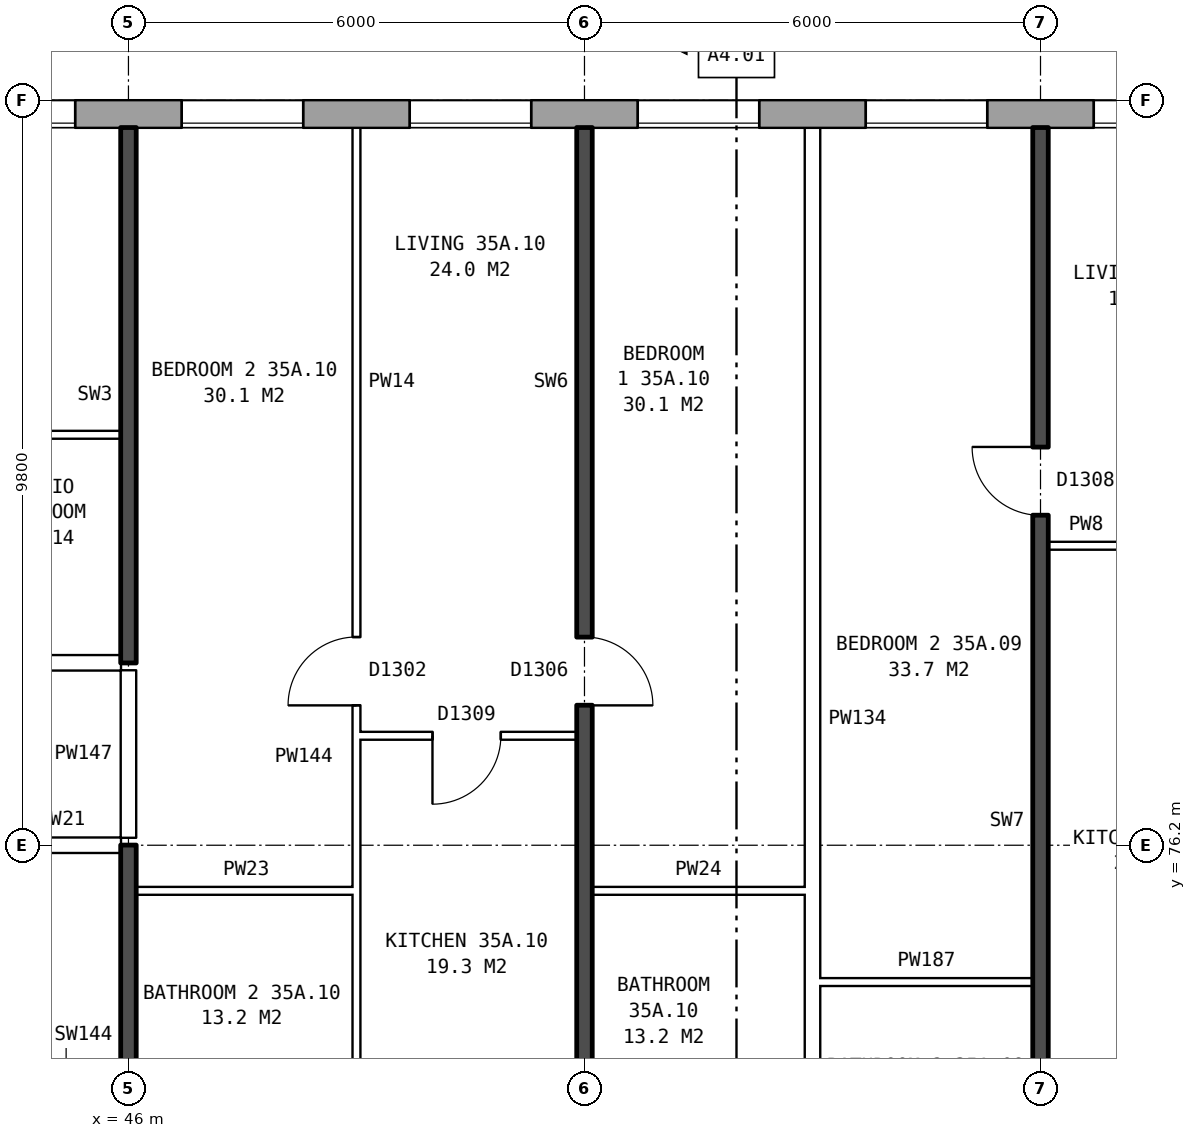
"""IFC4 building model, lengths in metres.
Left out: names, types, materials, properties, quantities, classifications, styles, units other than length and angle.
Written with IfcOpenShell. Run it as: python <this file> out.ifc"""

import sys

from ifc_helpers import new_model, si_unit, direction, frame, frame_2d, origin, place, context, subcontext, project, spatial, rectangle, extrude, element, fill, save


model = new_model("IFC4")
c1 = context("Model", 3, precision=1e-05, world=origin(), true_north=direction((0.0, 1.0)))
c2 = subcontext(c1, "Body", "Model", "MODEL_VIEW")
j1 = project(units=[si_unit("LENGTHUNIT", "METRE"), si_unit("PLANEANGLEUNIT", "RADIAN")], contexts=[c1])
p1 = place(None, origin())
s1 = spatial("IfcSite", under=j1, at=p1, CompositionType="ELEMENT")
p2 = place(p1, origin())
s2 = spatial("IfcBuilding", under=s1, at=p2, CompositionType="ELEMENT")
p3 = place(p2, frame((0.0, 0.0, 126.8)))
s3 = spatial("IfcBuildingStorey", under=s2, at=p3, CompositionType="ELEMENT", Elevation=126.8)
p4 = place(p3, frame((72.925, 85.82, 0.0), z_axis=(0.0, 0.0, 1.0), x_axis=(-1.0, 0.0, 0.0)))
e1 = element("IfcWall", 1, at=p4, inside=s3, PredefinedType="STANDARD", context=c2, shape_type="SweptSolid", body=[
    extrude(rectangle(XDim=43.101, YDim=0.36, at=frame_2d((21.55, 0.0))), origin(), (0.0, 0.0, 1.0), 2.85),
])
p5 = place(p4, frame((0.625, 0.0, 0.8)))
e2 = element("IfcOpeningElement", 2, at=p5, cuts=e1, PredefinedType="OPENING", context=c2, shape_type="SweptSolid", body=[
    extrude(rectangle(XDim=1.6, YDim=1.8, at=frame_2d((0.8, 0.9))), frame((0.0, 0.19, 0.0), z_axis=(0.0, -1.0, 0.0), x_axis=(1.0, 0.0, 0.0)), (0.0, 0.0, 1.0), 0.38),
])
p6 = place(p4, frame((3.625, 0.0, 0.8)))
e3 = element("IfcOpeningElement", 3, at=p6, cuts=e1, PredefinedType="OPENING", context=c2, shape_type="SweptSolid", body=[
    extrude(rectangle(XDim=1.6, YDim=1.8, at=frame_2d((0.8, 0.9))), frame((0.0, 0.19, 0.0), z_axis=(0.0, -1.0, 0.0), x_axis=(1.0, 0.0, 0.0)), (0.0, 0.0, 1.0), 0.38),
])
p7 = place(p4, frame((5.525, 0.0, 1.7)))
e4 = element("IfcOpeningElement", 4, at=p7, cuts=e1, PredefinedType="OPENING", context=c2, shape_type="SweptSolid", body=[
    extrude(rectangle(XDim=0.8, YDim=0.9, at=frame_2d((0.4, 0.45))), frame((0.0, 0.19, 0.0), z_axis=(0.0, -1.0, 0.0), x_axis=(1.0, 0.0, 0.0)), (0.0, 0.0, 1.0), 0.38),
])
p8 = place(p4, frame((9.625, 0.0, 0.8)))
e5 = element("IfcOpeningElement", 5, at=p8, cuts=e1, PredefinedType="OPENING", context=c2, shape_type="SweptSolid", body=[
    extrude(rectangle(XDim=1.6, YDim=1.8, at=frame_2d((0.8, 0.9))), frame((0.0, 0.19, 0.0), z_axis=(0.0, -1.0, 0.0), x_axis=(1.0, 0.0, 0.0)), (0.0, 0.0, 1.0), 0.38),
])
p9 = place(p4, frame((12.625, 0.0, 0.8)))
e6 = element("IfcOpeningElement", 6, at=p9, cuts=e1, PredefinedType="OPENING", context=c2, shape_type="SweptSolid", body=[
    extrude(rectangle(XDim=1.6, YDim=1.8, at=frame_2d((0.8, 0.9))), frame((0.0, 0.19, 0.0), z_axis=(0.0, -1.0, 0.0), x_axis=(1.0, 0.0, 0.0)), (0.0, 0.0, 1.0), 0.38),
])
p10 = place(p4, frame((15.625, 0.0, 0.8)))
e7 = element("IfcOpeningElement", 7, at=p10, cuts=e1, PredefinedType="OPENING", context=c2, shape_type="SweptSolid", body=[
    extrude(rectangle(XDim=1.6, YDim=1.8, at=frame_2d((0.8, 0.9))), frame((0.0, 0.19, 0.0), z_axis=(0.0, -1.0, 0.0), x_axis=(1.0, 0.0, 0.0)), (0.0, 0.0, 1.0), 0.38),
])
p11 = place(p4, frame((18.625, 0.0, 0.8)))
e8 = element("IfcOpeningElement", 8, at=p11, cuts=e1, PredefinedType="OPENING", context=c2, shape_type="SweptSolid", body=[
    extrude(rectangle(XDim=1.6, YDim=1.8, at=frame_2d((0.8, 0.9))), frame((0.0, 0.19, 0.0), z_axis=(0.0, -1.0, 0.0), x_axis=(1.0, 0.0, 0.0)), (0.0, 0.0, 1.0), 0.38),
])
p12 = place(p4, frame((21.625, 0.0, 0.8)))
e9 = element("IfcOpeningElement", 9, at=p12, cuts=e1, PredefinedType="OPENING", context=c2, shape_type="SweptSolid", body=[
    extrude(rectangle(XDim=1.6, YDim=1.8, at=frame_2d((0.8, 0.9))), frame((0.0, 0.19, 0.0), z_axis=(0.0, -1.0, 0.0), x_axis=(1.0, 0.0, 0.0)), (0.0, 0.0, 1.0), 0.38),
])
p13 = place(p4, frame((24.625, 0.0, 0.8)))
e10 = element("IfcOpeningElement", 10, at=p13, cuts=e1, PredefinedType="OPENING", context=c2, shape_type="SweptSolid", body=[
    extrude(rectangle(XDim=1.6, YDim=1.8, at=frame_2d((0.8, 0.9))), frame((0.0, 0.19, 0.0), z_axis=(0.0, -1.0, 0.0), x_axis=(1.0, 0.0, 0.0)), (0.0, 0.0, 1.0), 0.38),
])
p14 = place(p4, frame((27.625, 0.0, 0.8)))
e11 = element("IfcOpeningElement", 11, at=p14, cuts=e1, PredefinedType="OPENING", context=c2, shape_type="SweptSolid", body=[
    extrude(rectangle(XDim=1.6, YDim=1.8, at=frame_2d((0.8, 0.9))), frame((0.0, 0.19, 0.0), z_axis=(0.0, -1.0, 0.0), x_axis=(1.0, 0.0, 0.0)), (0.0, 0.0, 1.0), 0.38),
])
p15 = place(p4, frame((30.625, 0.0, 0.8)))
e12 = element("IfcOpeningElement", 12, at=p15, cuts=e1, PredefinedType="OPENING", context=c2, shape_type="SweptSolid", body=[
    extrude(rectangle(XDim=1.6, YDim=1.8, at=frame_2d((0.8, 0.9))), frame((0.0, 0.19, 0.0), z_axis=(0.0, -1.0, 0.0), x_axis=(1.0, 0.0, 0.0)), (0.0, 0.0, 1.0), 0.38),
])
p16 = place(p4, frame((33.125, 0.0, 0.8)))
e13 = element("IfcOpeningElement", 13, at=p16, cuts=e1, PredefinedType="OPENING", context=c2, shape_type="SweptSolid", body=[
    extrude(rectangle(XDim=1.4, YDim=1.8, at=frame_2d((0.7, 0.9))), frame((0.0, 0.19, 0.0), z_axis=(0.0, -1.0, 0.0), x_axis=(1.0, 0.0, 0.0)), (0.0, 0.0, 1.0), 0.38),
])
p17 = place(p4, frame((34.825, 0.0, 0.8)))
e14 = element("IfcOpeningElement", 14, at=p17, cuts=e1, PredefinedType="OPENING", context=c2, shape_type="SweptSolid", body=[
    extrude(rectangle(XDim=0.6, YDim=0.9, at=frame_2d((0.3, 0.45))), frame((0.0, 0.19, 0.0), z_axis=(0.0, -1.0, 0.0), x_axis=(1.0, 0.0, 0.0)), (0.0, 0.0, 1.0), 0.38),
])
p18 = place(p4, frame((39.625, 0.0, 0.8)))
e15 = element("IfcOpeningElement", 15, at=p18, cuts=e1, PredefinedType="OPENING", context=c2, shape_type="SweptSolid", body=[
    extrude(rectangle(XDim=1.6, YDim=1.8, at=frame_2d((0.8, 0.9))), frame((0.0, 0.19, 0.0), z_axis=(0.0, -1.0, 0.0), x_axis=(1.0, 0.0, 0.0)), (0.0, 0.0, 1.0), 0.38),
])
p19 = place(p4, frame((7.525, 0.0, 0.8)))
e16 = element("IfcOpeningElement", 16, at=p19, cuts=e1, PredefinedType="OPENING", context=c2, shape_type="SweptSolid", body=[
    extrude(rectangle(XDim=1.2, YDim=0.9, at=frame_2d((0.6, 0.45))), frame((0.0, 0.19, 0.0), z_axis=(0.0, -1.0, 0.0), x_axis=(1.0, 0.0, 0.0)), (0.0, 0.0, 1.0), 0.38),
])
p20 = place(p4, frame((36.725, 0.0, 1.7)))
e17 = element("IfcOpeningElement", 17, at=p20, cuts=e1, PredefinedType="OPENING", context=c2, shape_type="SweptSolid", body=[
    extrude(rectangle(XDim=0.6, YDim=0.9, at=frame_2d((0.3, 0.45))), frame((0.0, 0.19, 0.0), z_axis=(0.0, -1.0, 0.0), x_axis=(1.0, 0.0, 0.0)), (0.0, 0.0, 1.0), 0.38),
])
p21 = place(p4, frame((37.725, 0.0, 0.8)))
e18 = element("IfcOpeningElement", 18, at=p21, cuts=e1, PredefinedType="OPENING", context=c2, shape_type="SweptSolid", body=[
    extrude(rectangle(XDim=1.0, YDim=1.8, at=frame_2d((0.5, 0.9))), frame((0.0, 0.19, 0.0), z_axis=(0.0, -1.0, 0.0), x_axis=(1.0, 0.0, 0.0)), (0.0, 0.0, 1.0), 0.38),
])
p22 = place(p3, frame((55.1, 74.4, 0.0), z_axis=(0.0, 0.0, 1.0), x_axis=(1.0, 0.0, 0.0)))
e19 = element("IfcWall", 19, at=p22, inside=s3, PredefinedType="PARTITIONING", context=c2, shape_type="SweptSolid", body=[
    extrude(rectangle(XDim=2.8, YDim=0.1, at=frame_2d((1.4, 0.0))), origin(), (0.0, 0.0, 1.0), 2.85),
])
p23 = place(p3, frame((46.1, 75.6, 0.0), z_axis=(0.0, 0.0, 1.0), x_axis=(1.0, 0.0, 0.0)))
e20 = element("IfcWall", 20, at=p23, inside=s3, PredefinedType="PARTITIONING", context=c2, shape_type="SweptSolid", body=[
    extrude(rectangle(XDim=2.9, YDim=0.1, at=frame_2d((1.45, 0.0))), origin(), (0.0, 0.0, 1.0), 2.85),
])
p24 = place(p3, frame((52.1, 75.6, 0.0), z_axis=(0.0, 0.0, 1.0), x_axis=(1.0, 0.0, 0.0)))
e21 = element("IfcWall", 21, at=p24, inside=s3, PredefinedType="PARTITIONING", context=c2, shape_type="SweptSolid", body=[
    extrude(rectangle(XDim=2.8, YDim=0.1, at=frame_2d((1.4, 0.0))), origin(), (0.0, 0.0, 1.0), 2.85),
])
p25 = place(p3, frame((44.36, 76.2, 0.0), z_axis=(0.0, 0.0, 1.0), x_axis=(1.0, 0.0, 0.0)))
e22 = element("IfcWall", 22, at=p25, inside=s3, PredefinedType="PARTITIONING", context=c2, shape_type="SweptSolid", body=[
    extrude(rectangle(XDim=1.54, YDim=0.2, at=frame_2d((0.77, 0.0))), origin(), (0.0, 0.0, 1.0), 2.85),
])
p26 = place(p3, frame((49.0, 77.64, 0.0), z_axis=(0.0, 0.0, 1.0), x_axis=(1.0, 0.0, 0.0)))
e23 = element("IfcWall", 23, at=p26, inside=s3, PredefinedType="PARTITIONING", context=c2, shape_type="SweptSolid", body=[
    extrude(rectangle(XDim=2.9, YDim=0.1, at=frame_2d((1.45, 0.0))), origin(), (0.0, 0.0, 1.0), 2.85),
])
p27 = place(p26, frame((1.0, 0.0, 0.0)))
e24 = element("IfcOpeningElement", 24, at=p27, cuts=e23, PredefinedType="OPENING", context=c2, shape_type="SweptSolid", body=[
    extrude(rectangle(XDim=0.9, YDim=2.1, at=frame_2d((0.45, 1.05))), frame((0.0, 0.06, 0.0), z_axis=(0.0, -1.0, 0.0), x_axis=(1.0, 0.0, 0.0)), (0.0, 0.0, 1.0), 0.12),
])
p28 = place(p3, frame((27.11, 78.6, 0.0), z_axis=(0.0, 0.0, 1.0), x_axis=(1.0, 0.0, 0.0)))
e25 = element("IfcWall", 25, at=p28, inside=s3, PredefinedType="PARTITIONING", context=c2, shape_type="SweptSolid", body=[
    extrude(rectangle(XDim=18.79, YDim=0.2, at=frame_2d((9.395, 0.0))), origin(), (0.0, 0.0, 1.0), 2.85),
])
p29 = place(p28, frame((14.19, 0.0, 0.0)))
e26 = element("IfcOpeningElement", 26, at=p29, cuts=e25, PredefinedType="OPENING", context=c2, shape_type="SweptSolid", body=[
    extrude(rectangle(XDim=1.0, YDim=2.1, at=frame_2d((0.5, 1.05))), frame((0.0, 0.11, 0.0), z_axis=(0.0, -1.0, 0.0), x_axis=(1.0, 0.0, 0.0)), (0.0, 0.0, 1.0), 0.22),
])
p30 = place(p28, frame((10.39, 0.0, 0.0)))
e27 = element("IfcOpeningElement", 27, at=p30, cuts=e25, PredefinedType="OPENING", context=c2, shape_type="SweptSolid", body=[
    extrude(rectangle(XDim=1.0, YDim=2.1, at=frame_2d((0.5, 1.05))), frame((0.0, 0.11, 0.0), z_axis=(0.0, -1.0, 0.0), x_axis=(1.0, 0.0, 0.0)), (0.0, 0.0, 1.0), 0.22),
])
p31 = place(p28, frame((4.59, 0.0, 0.0)))
e28 = element("IfcOpeningElement", 28, at=p31, cuts=e25, PredefinedType="OPENING", context=c2, shape_type="SweptSolid", body=[
    extrude(rectangle(XDim=1.0, YDim=2.1, at=frame_2d((0.5, 1.05))), frame((0.0, 0.11, 0.0), z_axis=(0.0, -1.0, 0.0), x_axis=(1.0, 0.0, 0.0)), (0.0, 0.0, 1.0), 0.22),
])
p32 = place(p3, frame((58.1, 80.14, 0.0), z_axis=(0.0, 0.0, 1.0), x_axis=(1.0, 0.0, 0.0)))
e29 = element("IfcWall", 29, at=p32, inside=s3, PredefinedType="PARTITIONING", context=c2, shape_type="SweptSolid", body=[
    extrude(rectangle(XDim=2.9, YDim=0.1, at=frame_2d((1.45, 0.0))), origin(), (0.0, 0.0, 1.0), 2.85),
])
p33 = place(p32, frame((1.0, 0.0, 0.0)))
e30 = element("IfcOpeningElement", 30, at=p33, cuts=e29, PredefinedType="OPENING", context=c2, shape_type="SweptSolid", body=[
    extrude(rectangle(XDim=0.9, YDim=2.1, at=frame_2d((0.45, 1.05))), frame((0.0, 0.06, 0.0), z_axis=(0.0, -1.0, 0.0), x_axis=(1.0, 0.0, 0.0)), (0.0, 0.0, 1.0), 0.12),
])
p34 = place(p3, frame((43.6, 81.6, 0.0), z_axis=(0.0, 0.0, 1.0), x_axis=(1.0, 0.0, 0.0)))
e31 = element("IfcWall", 31, at=p34, inside=s3, PredefinedType="PARTITIONING", context=c2, shape_type="SweptSolid", body=[
    extrude(rectangle(XDim=2.3, YDim=0.1, at=frame_2d((1.15, 0.0))), origin(), (0.0, 0.0, 1.0), 2.85),
])
p35 = place(p3, frame((46.0, 71.2, 0.0), z_axis=(0.0, 0.0, 1.0), x_axis=(0.0, 1.0, 0.0)))
e32 = element("IfcWall", 32, at=p35, inside=s3, PredefinedType="SOLIDWALL", context=c2, shape_type="SweptSolid", body=[
    extrude(rectangle(XDim=5.0, YDim=0.2, at=frame_2d((2.5, 0.0))), origin(), (0.0, 0.0, 1.0), 2.85),
])
p36 = place(p3, frame((46.0, 76.3, 0.0), z_axis=(0.0, 0.0, 1.0), x_axis=(0.0, 1.0, 0.0)))
e33 = element("IfcWall", 33, at=p36, inside=s3, PredefinedType="PARTITIONING", context=c2, shape_type="SweptSolid", body=[
    extrude(rectangle(XDim=2.2, YDim=0.2, at=frame_2d((1.1, 0.0))), origin(), (0.0, 0.0, 1.0), 2.85),
])
p37 = place(p3, frame((46.0, 78.6, 0.0), z_axis=(0.0, 0.0, 1.0), x_axis=(0.0, 1.0, 0.0)))
e34 = element("IfcWall", 34, at=p37, inside=s3, PredefinedType="SOLIDWALL", context=c2, shape_type="SweptSolid", body=[
    extrude(rectangle(XDim=7.04, YDim=0.2, at=frame_2d((3.52, 0.0))), origin(), (0.0, 0.0, 1.0), 2.85),
])
p38 = place(p3, frame((49.0, 71.3, 0.0), z_axis=(0.0, 0.0, 1.0), x_axis=(0.0, 1.0, 0.0)))
e35 = element("IfcWall", 35, at=p38, inside=s3, PredefinedType="PARTITIONING", context=c2, shape_type="SweptSolid", body=[
    extrude(rectangle(XDim=14.34, YDim=0.1, at=frame_2d((7.17, 0.0))), origin(), (0.0, 0.0, 1.0), 2.85),
])
p39 = place(p38, frame((6.74, 0.0, 0.0)))
e36 = element("IfcOpeningElement", 36, at=p39, cuts=e35, PredefinedType="OPENING", context=c2, shape_type="SweptSolid", body=[
    extrude(rectangle(XDim=0.9, YDim=2.1, at=frame_2d((0.45, 1.05))), frame((0.0, 0.06, 0.0), z_axis=(0.0, -1.0, 0.0), x_axis=(1.0, 0.0, 0.0)), (0.0, 0.0, 1.0), 0.12),
])
p40 = place(p38, frame((0.4, 0.0, 0.0)))
e37 = element("IfcOpeningElement", 37, at=p40, cuts=e35, PredefinedType="OPENING", context=c2, shape_type="SweptSolid", body=[
    extrude(rectangle(XDim=0.9, YDim=2.1, at=frame_2d((0.45, 1.05))), frame((0.0, 0.06, 0.0), z_axis=(0.0, -1.0, 0.0), x_axis=(1.0, 0.0, 0.0)), (0.0, 0.0, 1.0), 0.12),
])
p41 = place(p3, frame((52.0, 71.2, 0.0), z_axis=(0.0, 0.0, 1.0), x_axis=(0.0, 1.0, 0.0)))
e38 = element("IfcWall", 38, at=p41, inside=s3, PredefinedType="SOLIDWALL", context=c2, shape_type="SweptSolid", body=[
    extrude(rectangle(XDim=14.44, YDim=0.2, at=frame_2d((7.22, 0.0))), origin(), (0.0, 0.0, 1.0), 2.85),
])
p42 = place(p41, frame((6.84, 0.0, 0.0)))
e39 = element("IfcOpeningElement", 39, at=p42, cuts=e38, PredefinedType="OPENING", context=c2, shape_type="SweptSolid", body=[
    extrude(rectangle(XDim=0.9, YDim=2.1, at=frame_2d((0.45, 1.05))), frame((0.0, 0.11, 0.0), z_axis=(0.0, -1.0, 0.0), x_axis=(1.0, 0.0, 0.0)), (0.0, 0.0, 1.0), 0.22),
])
p43 = place(p41, frame((0.4, 0.0, 0.0)))
e40 = element("IfcOpeningElement", 40, at=p43, cuts=e38, PredefinedType="OPENING", context=c2, shape_type="SweptSolid", body=[
    extrude(rectangle(XDim=0.9, YDim=2.1, at=frame_2d((0.45, 1.05))), frame((0.0, 0.11, 0.0), z_axis=(0.0, -1.0, 0.0), x_axis=(1.0, 0.0, 0.0)), (0.0, 0.0, 1.0), 0.22),
])
p44 = place(p3, frame((55.0, 71.3, 0.0), z_axis=(0.0, 0.0, 1.0), x_axis=(0.0, 1.0, 0.0)))
e41 = element("IfcWall", 41, at=p44, inside=s3, PredefinedType="PARTITIONING", context=c2, shape_type="SweptSolid", body=[
    extrude(rectangle(XDim=14.34, YDim=0.2, at=frame_2d((7.17, 0.0))), origin(), (0.0, 0.0, 1.0), 2.85),
])
p45 = place(p3, frame((58.0, 71.2, 0.0), z_axis=(0.0, 0.0, 1.0), x_axis=(0.0, 1.0, 0.0)))
e42 = element("IfcWall", 42, at=p45, inside=s3, PredefinedType="SOLIDWALL", context=c2, shape_type="SweptSolid", body=[
    extrude(rectangle(XDim=14.44, YDim=0.2, at=frame_2d((7.22, 0.0))), origin(), (0.0, 0.0, 1.0), 2.85),
])
p46 = place(p45, frame((9.34, 0.0, 0.0)))
e43 = element("IfcOpeningElement", 43, at=p46, cuts=e42, PredefinedType="OPENING", context=c2, shape_type="SweptSolid", body=[
    extrude(rectangle(XDim=0.9, YDim=2.1, at=frame_2d((0.45, 1.05))), frame((0.0, 0.11, 0.0), z_axis=(0.0, -1.0, 0.0), x_axis=(1.0, 0.0, 0.0)), (0.0, 0.0, 1.0), 0.22),
])
p47 = place(p45, frame((0.4, 0.0, 0.0)))
e44 = element("IfcOpeningElement", 44, at=p47, cuts=e42, PredefinedType="OPENING", context=c2, shape_type="SweptSolid", body=[
    extrude(rectangle(XDim=0.9, YDim=2.1, at=frame_2d((0.45, 1.05))), frame((0.0, 0.11, 0.0), z_axis=(0.0, -1.0, 0.0), x_axis=(1.0, 0.0, 0.0)), (0.0, 0.0, 1.0), 0.22),
])
p48 = place(p9, origin())
e45 = element("IfcWindow", 45, at=p48, inside=s3, PartitioningType="SINGLE_PANEL", PredefinedType="WINDOW", context=c2, shape_type="SweptSolid", body=[
    extrude(rectangle(XDim=1.6, YDim=1.8, at=frame_2d((0.8, 0.9))), frame((0.0, 0.15, 0.0), z_axis=(0.0, -1.0, 0.0), x_axis=(1.0, 0.0, 0.0)), (0.0, 0.0, 1.0), 0.06),
])
fill(e6, e45)
p49 = place(p10, origin())
e46 = element("IfcWindow", 46, at=p49, inside=s3, PartitioningType="SINGLE_PANEL", PredefinedType="WINDOW", context=c2, shape_type="SweptSolid", body=[
    extrude(rectangle(XDim=1.6, YDim=1.8, at=frame_2d((0.8, 0.9))), frame((0.0, 0.15, 0.0), z_axis=(0.0, -1.0, 0.0), x_axis=(1.0, 0.0, 0.0)), (0.0, 0.0, 1.0), 0.06),
])
fill(e7, e46)
p50 = place(p11, origin())
e47 = element("IfcWindow", 47, at=p50, inside=s3, PartitioningType="SINGLE_PANEL", PredefinedType="WINDOW", context=c2, shape_type="SweptSolid", body=[
    extrude(rectangle(XDim=1.6, YDim=1.8, at=frame_2d((0.8, 0.9))), frame((0.0, 0.15, 0.0), z_axis=(0.0, -1.0, 0.0), x_axis=(1.0, 0.0, 0.0)), (0.0, 0.0, 1.0), 0.06),
])
fill(e8, e47)
p51 = place(p12, origin())
e48 = element("IfcWindow", 48, at=p51, inside=s3, PartitioningType="SINGLE_PANEL", PredefinedType="WINDOW", context=c2, shape_type="SweptSolid", body=[
    extrude(rectangle(XDim=1.6, YDim=1.8, at=frame_2d((0.8, 0.9))), frame((0.0, 0.15, 0.0), z_axis=(0.0, -1.0, 0.0), x_axis=(1.0, 0.0, 0.0)), (0.0, 0.0, 1.0), 0.06),
])
fill(e9, e48)
p52 = place(p13, origin())
e49 = element("IfcWindow", 49, at=p52, inside=s3, PartitioningType="SINGLE_PANEL", PredefinedType="WINDOW", context=c2, shape_type="SweptSolid", body=[
    extrude(rectangle(XDim=1.6, YDim=1.8, at=frame_2d((0.8, 0.9))), frame((0.0, 0.15, 0.0), z_axis=(0.0, -1.0, 0.0), x_axis=(1.0, 0.0, 0.0)), (0.0, 0.0, 1.0), 0.06),
])
fill(e10, e49)
p53 = place(p14, origin())
e50 = element("IfcWindow", 50, at=p53, inside=s3, PartitioningType="SINGLE_PANEL", PredefinedType="WINDOW", context=c2, shape_type="SweptSolid", body=[
    extrude(rectangle(XDim=1.6, YDim=1.8, at=frame_2d((0.8, 0.9))), frame((0.0, 0.15, 0.0), z_axis=(0.0, -1.0, 0.0), x_axis=(1.0, 0.0, 0.0)), (0.0, 0.0, 1.0), 0.06),
])
fill(e11, e50)
p54 = place(p46, origin())
e51 = element("IfcDoor", 51, at=p54, inside=s3, OperationType="SINGLE_SWING_RIGHT", PredefinedType="DOOR", context=c2, shape_type="SweptSolid", body=[
    extrude(rectangle(XDim=0.9, YDim=2.1, at=frame_2d((0.45, 1.05))), frame((0.0, 0.025, 0.0), z_axis=(0.0, -1.0, 0.0), x_axis=(1.0, 0.0, 0.0)), (0.0, 0.0, 1.0), 0.05),
])
fill(e43, e51)
p55 = place(p42, frame((0.9, 0.0, 0.0), z_axis=(0.0, 0.0, 1.0), x_axis=(-1.0, 0.0, 0.0)))
e52 = element("IfcDoor", 52, at=p55, inside=s3, OperationType="SINGLE_SWING_RIGHT", PredefinedType="DOOR", context=c2, shape_type="SweptSolid", body=[
    extrude(rectangle(XDim=0.9, YDim=2.1, at=frame_2d((0.45, 1.05))), frame((0.0, 0.025, 0.0), z_axis=(0.0, -1.0, 0.0), x_axis=(1.0, 0.0, 0.0)), (0.0, 0.0, 1.0), 0.05),
])
fill(e39, e52)
p56 = place(p39, origin())
e53 = element("IfcDoor", 53, at=p56, inside=s3, OperationType="SINGLE_SWING_LEFT", PredefinedType="DOOR", context=c2, shape_type="SweptSolid", body=[
    extrude(rectangle(XDim=0.9, YDim=2.1, at=frame_2d((0.45, 1.05))), frame((0.0, 0.025, 0.0), z_axis=(0.0, -1.0, 0.0), x_axis=(1.0, 0.0, 0.0)), (0.0, 0.0, 1.0), 0.05),
])
fill(e36, e53)
p57 = place(p27, frame((0.9, 0.0, 0.0), z_axis=(0.0, 0.0, 1.0), x_axis=(-1.0, 0.0, 0.0)))
e54 = element("IfcDoor", 54, at=p57, inside=s3, OperationType="SINGLE_SWING_RIGHT", PredefinedType="DOOR", context=c2, shape_type="SweptSolid", body=[
    extrude(rectangle(XDim=0.9, YDim=2.1, at=frame_2d((0.45, 1.05))), frame((0.0, 0.025, 0.0), z_axis=(0.0, -1.0, 0.0), x_axis=(1.0, 0.0, 0.0)), (0.0, 0.0, 1.0), 0.05),
])
fill(e24, e54)
save(model, sys.argv[1])
